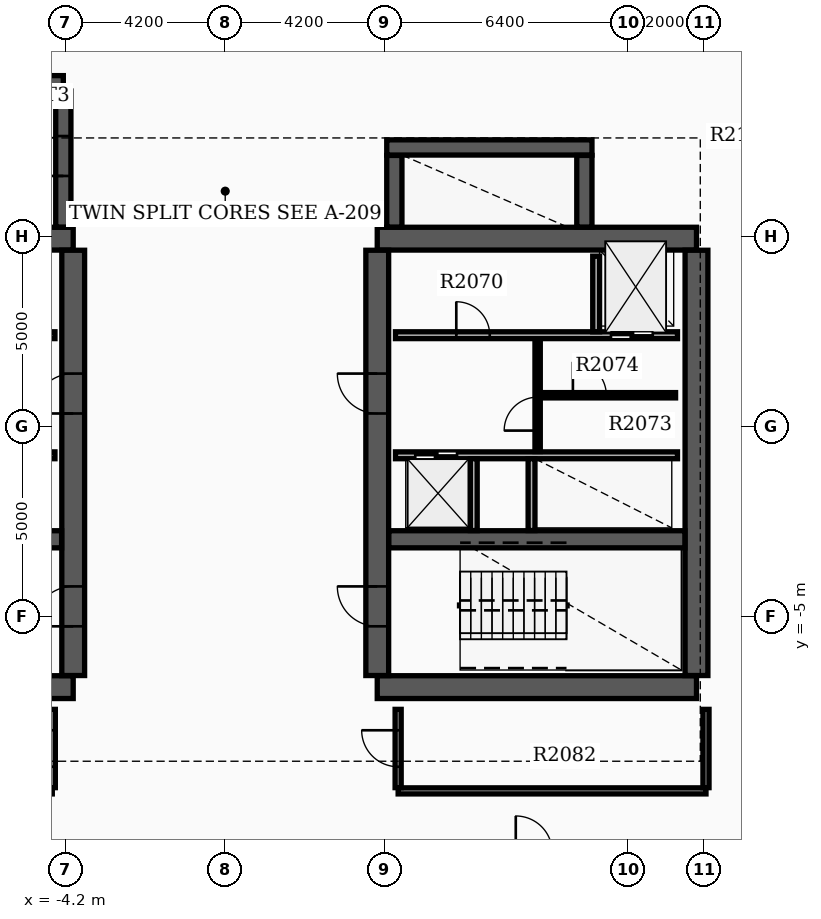
"""IFC4 building model, lengths in metres.
Left out: names, types, materials, properties, quantities, classifications, styles, units other than length and angle.
Written with IfcOpenShell. Run it as: python <this file> out.ifc"""

import sys

from ifc_helpers import new_model, si_unit, direction, frame, frame_2d, origin, place, context, subcontext, project, spatial, rectangle, extrude, element, fill, save


model = new_model("IFC4")
c1 = context("Model", 3, precision=1e-05, world=origin(), true_north=direction((0.0, 1.0)))
c2 = subcontext(c1, "Body", "Model", "MODEL_VIEW")
j1 = project(units=[si_unit("LENGTHUNIT", "METRE"), si_unit("PLANEANGLEUNIT", "RADIAN")], contexts=[c1])
p1 = place(None, origin())
s1 = spatial("IfcSite", under=j1, at=p1, CompositionType="ELEMENT")
p2 = place(p1, origin())
s2 = spatial("IfcBuilding", under=s1, at=p2, CompositionType="ELEMENT")
p3 = place(p2, frame((0.0, 0.0, 132.0)))
s3 = spatial("IfcBuildingStorey", under=s2, at=p3, CompositionType="ELEMENT", Elevation=132.0)
for number, where, z_axis, x_axis in (
    (1, (-12.4, -6.85, 0.0), (0.0, 0.0, 1.0), (1.0, 0.0, 0.0)),
    (2, (-12.4, 4.95, 0.0), (0.0, 0.0, 1.0), (1.0, 0.0, 0.0)),
):
    element("IfcWall", number, at=place(p3, frame(where, z_axis=z_axis, x_axis=x_axis)), inside=s3, PredefinedType="SHEAR", context=c2, shape_type="SweptSolid", body=[
        extrude(rectangle(XDim=8.4, YDim=0.6, at=frame_2d((4.2, 0.0))), origin(), (0.0, 0.0, 1.0), 3.7),
    ])
p4 = place(p3, frame((-4.0, -6.545, 0.0), z_axis=(0.0, 0.0, 1.0), x_axis=(0.0, 1.0, 0.0)))
e3 = element("IfcWall", 3, at=p4, inside=s3, PredefinedType="SHEAR", context=c2, shape_type="SweptSolid", body=[
    extrude(rectangle(XDim=11.19, YDim=0.6, at=frame_2d((5.595, 0.0))), origin(), (0.0, 0.0, 1.0), 3.7),
])
p5 = place(p4, frame((1.295, 0.0, 0.0)))
e4 = element("IfcOpeningElement", 4, at=p5, cuts=e3, PredefinedType="OPENING", context=c2, shape_type="SweptSolid", body=[
    extrude(rectangle(XDim=1.05, YDim=2.15, at=frame_2d((0.525, 1.075))), frame((0.0, 0.31, 0.0), z_axis=(0.0, -1.0, 0.0), x_axis=(1.0, 0.0, 0.0)), (0.0, 0.0, 1.0), 0.62),
])
p6 = place(p4, frame((6.895, 0.0, 0.0)))
e5 = element("IfcOpeningElement", 5, at=p6, cuts=e3, PredefinedType="OPENING", context=c2, shape_type="SweptSolid", body=[
    extrude(rectangle(XDim=1.05, YDim=2.15, at=frame_2d((0.525, 1.075))), frame((0.0, 0.31, 0.0), z_axis=(0.0, -1.0, 0.0), x_axis=(1.0, 0.0, 0.0)), (0.0, 0.0, 1.0), 0.62),
])
p7 = place(p3, frame((-12.095, -2.96, 0.0), z_axis=(0.0, 0.0, 1.0), x_axis=(1.0, 0.0, 0.0)))
e6 = element("IfcWall", 6, at=p7, inside=s3, PredefinedType="SHEAR", context=c2, shape_type="SweptSolid", body=[
    extrude(rectangle(XDim=7.79, YDim=0.45, at=frame_2d((3.895, 0.0))), origin(), (0.0, 0.0, 1.0), 3.7),
])
for number, where, z_axis, x_axis in (
    (7, (4.0, -6.85, 0.0), (0.0, 0.0, 1.0), (1.0, 0.0, 0.0)),
    (8, (4.0, 4.95, 0.0), (0.0, 0.0, 1.0), (1.0, 0.0, 0.0)),
):
    element("IfcWall", number, at=place(p3, frame(where, z_axis=z_axis, x_axis=x_axis)), inside=s3, PredefinedType="SHEAR", context=c2, shape_type="SweptSolid", body=[
        extrude(rectangle(XDim=8.4, YDim=0.6, at=frame_2d((4.2, 0.0))), origin(), (0.0, 0.0, 1.0), 3.7),
    ])
p8 = place(p3, frame((4.0, -6.545, 0.0), z_axis=(0.0, 0.0, 1.0), x_axis=(0.0, 1.0, 0.0)))
e9 = element("IfcWall", 9, at=p8, inside=s3, PredefinedType="SHEAR", context=c2, shape_type="SweptSolid", body=[
    extrude(rectangle(XDim=11.19, YDim=0.6, at=frame_2d((5.595, 0.0))), origin(), (0.0, 0.0, 1.0), 3.7),
])
p9 = place(p8, frame((1.295, 0.0, 0.0)))
e10 = element("IfcOpeningElement", 10, at=p9, cuts=e9, PredefinedType="OPENING", context=c2, shape_type="SweptSolid", body=[
    extrude(rectangle(XDim=1.05, YDim=2.15, at=frame_2d((0.525, 1.075))), frame((0.0, 0.31, 0.0), z_axis=(0.0, -1.0, 0.0), x_axis=(1.0, 0.0, 0.0)), (0.0, 0.0, 1.0), 0.62),
])
p10 = place(p8, frame((6.895, 0.0, 0.0)))
e11 = element("IfcOpeningElement", 11, at=p10, cuts=e9, PredefinedType="OPENING", context=c2, shape_type="SweptSolid", body=[
    extrude(rectangle(XDim=1.05, YDim=2.15, at=frame_2d((0.525, 1.075))), frame((0.0, 0.31, 0.0), z_axis=(0.0, -1.0, 0.0), x_axis=(1.0, 0.0, 0.0)), (0.0, 0.0, 1.0), 0.62),
])
p11 = place(p3, frame((12.4, -6.545, 0.0), z_axis=(0.0, 0.0, 1.0), x_axis=(0.0, 1.0, 0.0)))
e12 = element("IfcWall", 12, at=p11, inside=s3, PredefinedType="SHEAR", context=c2, shape_type="SweptSolid", body=[
    extrude(rectangle(XDim=11.19, YDim=0.6, at=frame_2d((5.595, 0.0))), origin(), (0.0, 0.0, 1.0), 3.7),
])
p12 = place(p3, frame((4.305, -2.96, 0.0), z_axis=(0.0, 0.0, 1.0), x_axis=(1.0, 0.0, 0.0)))
e13 = element("IfcWall", 13, at=p12, inside=s3, PredefinedType="SHEAR", context=c2, shape_type="SweptSolid", body=[
    extrude(rectangle(XDim=7.79, YDim=0.45, at=frame_2d((3.895, 0.0))), origin(), (0.0, 0.0, 1.0), 3.7),
])
p13 = place(p3, frame((-12.22, 9.04, 0.0), z_axis=(0.0, 0.0, 1.0), x_axis=(1.0, 0.0, 0.0)))
e14 = element("IfcWall", 14, at=p13, inside=s3, PredefinedType="SHEAR", context=c2, shape_type="SweptSolid", body=[
    extrude(rectangle(XDim=7.96, YDim=0.4, at=frame_2d((3.98, 0.0))), origin(), (0.0, 0.0, 1.0), 3.7),
])
p14 = place(p3, frame((-4.26, 5.255, 0.0), z_axis=(0.0, 0.0, 1.0), x_axis=(0.0, 1.0, 0.0)))
e15 = element("IfcWall", 15, at=p14, inside=s3, PredefinedType="SHEAR", context=c2, shape_type="SweptSolid", body=[
    extrude(rectangle(XDim=3.58, YDim=0.4, at=frame_2d((1.79, 0.0))), origin(), (0.0, 0.0, 1.0), 3.7),
])
p15 = place(p14, frame((1.345, 0.0, 0.0)))
e16 = element("IfcOpeningElement", 16, at=p15, cuts=e15, PredefinedType="OPENING", context=c2, shape_type="SweptSolid", body=[
    extrude(rectangle(XDim=1.05, YDim=2.15, at=frame_2d((0.525, 1.075))), frame((0.0, 0.21, 0.0), z_axis=(0.0, -1.0, 0.0), x_axis=(1.0, 0.0, 0.0)), (0.0, 0.0, 1.0), 0.42),
])
p16 = place(p3, frame((4.45, 5.255, 0.0), z_axis=(0.0, 0.0, 1.0), x_axis=(0.0, 1.0, 0.0)))
e17 = element("IfcWall", 17, at=p16, inside=s3, PredefinedType="SHEAR", context=c2, shape_type="SweptSolid", body=[
    extrude(rectangle(XDim=1.885, YDim=0.4, at=frame_2d((0.942, 0.0))), origin(), (0.0, 0.0, 1.0), 3.7),
])
p17 = place(p3, frame((4.25, 7.35, 0.0), z_axis=(0.0, 0.0, 1.0), x_axis=(1.0, 0.0, 0.0)))
e18 = element("IfcWall", 18, at=p17, inside=s3, PredefinedType="SHEAR", context=c2, shape_type="SweptSolid", body=[
    extrude(rectangle(XDim=5.4, YDim=0.4, at=frame_2d((2.7, 0.0))), origin(), (0.0, 0.0, 1.0), 3.7),
])
p18 = place(p3, frame((9.45, 5.255, 0.0), z_axis=(0.0, 0.0, 1.0), x_axis=(0.0, 1.0, 0.0)))
e19 = element("IfcWall", 19, at=p18, inside=s3, PredefinedType="SHEAR", context=c2, shape_type="SweptSolid", body=[
    extrude(rectangle(XDim=1.885, YDim=0.4, at=frame_2d((0.942, 0.0))), origin(), (0.0, 0.0, 1.0), 3.7),
])
p19 = place(p3, frame((-11.9, 2.41, 0.0), z_axis=(0.0, 0.0, 1.0), x_axis=(1.0, 0.0, 0.0)))
e20 = element("IfcWall", 20, at=p19, inside=s3, PredefinedType="SOLIDWALL", context=c2, shape_type="SweptSolid", body=[
    extrude(rectangle(XDim=7.42, YDim=0.18, at=frame_2d((3.71, 0.0))), origin(), (0.0, 0.0, 1.0), 2.96),
])
p20 = place(p19, frame((0.55, 0.0, 0.0)))
e21 = element("IfcOpeningElement", 21, at=p20, cuts=e20, PredefinedType="OPENING", context=c2, shape_type="SweptSolid", body=[
    extrude(rectangle(XDim=1.1, YDim=2.15, at=frame_2d((0.55, 1.075))), frame((0.0, 0.1, 0.0), z_axis=(0.0, -1.0, 0.0), x_axis=(1.0, 0.0, 0.0)), (0.0, 0.0, 1.0), 0.2),
])
p21 = place(p19, frame((4.9, 0.0, 0.0)))
e22 = element("IfcOpeningElement", 22, at=p21, cuts=e20, PredefinedType="OPENING", context=c2, shape_type="SweptSolid", body=[
    extrude(rectangle(XDim=0.88, YDim=2.1, at=frame_2d((0.44, 1.05))), frame((0.0, 0.1, 0.0), z_axis=(0.0, -1.0, 0.0), x_axis=(1.0, 0.0, 0.0)), (0.0, 0.0, 1.0), 0.2),
])
p22 = place(p3, frame((4.48, 2.41, 0.0), z_axis=(0.0, 0.0, 1.0), x_axis=(1.0, 0.0, 0.0)))
e23 = element("IfcWall", 23, at=p22, inside=s3, PredefinedType="SOLIDWALL", context=c2, shape_type="SweptSolid", body=[
    extrude(rectangle(XDim=7.42, YDim=0.18, at=frame_2d((3.71, 0.0))), origin(), (0.0, 0.0, 1.0), 2.96),
])
p23 = place(p22, frame((5.67, 0.0, 0.0)))
e24 = element("IfcOpeningElement", 24, at=p23, cuts=e23, PredefinedType="OPENING", context=c2, shape_type="SweptSolid", body=[
    extrude(rectangle(XDim=1.1, YDim=2.15, at=frame_2d((0.55, 1.075))), frame((0.0, 0.1, 0.0), z_axis=(0.0, -1.0, 0.0), x_axis=(1.0, 0.0, 0.0)), (0.0, 0.0, 1.0), 0.2),
])
p24 = place(p22, frame((1.6, 0.0, 0.0)))
e25 = element("IfcOpeningElement", 25, at=p24, cuts=e23, PredefinedType="OPENING", context=c2, shape_type="SweptSolid", body=[
    extrude(rectangle(XDim=0.88, YDim=2.1, at=frame_2d((0.44, 1.05))), frame((0.0, 0.1, 0.0), z_axis=(0.0, -1.0, 0.0), x_axis=(1.0, 0.0, 0.0)), (0.0, 0.0, 1.0), 0.2),
])
p25 = place(p3, frame((-11.9, -0.75, 0.0), z_axis=(0.0, 0.0, 1.0), x_axis=(1.0, 0.0, 0.0)))
e26 = element("IfcWall", 26, at=p25, inside=s3, PredefinedType="SOLIDWALL", context=c2, shape_type="SweptSolid", body=[
    extrude(rectangle(XDim=7.42, YDim=0.18, at=frame_2d((3.71, 0.0))), origin(), (0.0, 0.0, 1.0), 2.96),
])
p26 = place(p25, frame((0.45, 0.0, 0.0)))
e27 = element("IfcOpeningElement", 27, at=p26, cuts=e26, PredefinedType="OPENING", context=c2, shape_type="SweptSolid", body=[
    extrude(rectangle(XDim=1.1, YDim=2.15, at=frame_2d((0.55, 1.075))), frame((0.0, 0.1, 0.0), z_axis=(0.0, -1.0, 0.0), x_axis=(1.0, 0.0, 0.0)), (0.0, 0.0, 1.0), 0.2),
])
p27 = place(p25, frame((2.35, 0.0, 0.0)))
e28 = element("IfcOpeningElement", 28, at=p27, cuts=e26, PredefinedType="OPENING", context=c2, shape_type="SweptSolid", body=[
    extrude(rectangle(XDim=1.1, YDim=2.15, at=frame_2d((0.55, 1.075))), frame((0.0, 0.1, 0.0), z_axis=(0.0, -1.0, 0.0), x_axis=(1.0, 0.0, 0.0)), (0.0, 0.0, 1.0), 0.2),
])
p28 = place(p3, frame((4.48, -0.75, 0.0), z_axis=(0.0, 0.0, 1.0), x_axis=(1.0, 0.0, 0.0)))
e29 = element("IfcWall", 29, at=p28, inside=s3, PredefinedType="SOLIDWALL", context=c2, shape_type="SweptSolid", body=[
    extrude(rectangle(XDim=7.42, YDim=0.18, at=frame_2d((3.71, 0.0))), origin(), (0.0, 0.0, 1.0), 2.96),
])
p29 = place(p28, frame((0.52, 0.0, 0.0)))
e30 = element("IfcOpeningElement", 30, at=p29, cuts=e29, PredefinedType="OPENING", context=c2, shape_type="SweptSolid", body=[
    extrude(rectangle(XDim=1.1, YDim=2.15, at=frame_2d((0.55, 1.075))), frame((0.0, 0.1, 0.0), z_axis=(0.0, -1.0, 0.0), x_axis=(1.0, 0.0, 0.0)), (0.0, 0.0, 1.0), 0.2),
])
p30 = place(p3, frame((9.76, 2.5, 0.0), z_axis=(0.0, 0.0, 1.0), x_axis=(0.0, 1.0, 0.0)))
e31 = element("IfcWall", 31, at=p30, inside=s3, PredefinedType="SOLIDWALL", context=c2, shape_type="SweptSolid", body=[
    extrude(rectangle(XDim=1.99, YDim=0.18, at=frame_2d((0.995, 0.0))), origin(), (0.0, 0.0, 1.0), 2.96),
])
for number, where, z_axis, x_axis in (
    (32, (6.54, -2.73, 0.0), (0.0, 0.0, 1.0), (0.0, 1.0, 0.0)),
    (33, (8.06, -2.73, 0.0), (0.0, 0.0, 1.0), (0.0, 1.0, 0.0)),
):
    element("IfcWall", number, at=place(p3, frame(where, z_axis=z_axis, x_axis=x_axis)), inside=s3, PredefinedType="SOLIDWALL", context=c2, shape_type="SweptSolid", body=[
        extrude(rectangle(XDim=1.89, YDim=0.18, at=frame_2d((0.945, 0.0))), origin(), (0.0, 0.0, 1.0), 2.96),
    ])
p31 = place(p3, frame((8.22, -0.65, 0.0), z_axis=(0.0, 0.0, 1.0), x_axis=(0.0, 1.0, 0.0)))
e34 = element("IfcWall", 34, at=p31, inside=s3, PredefinedType="SOLIDWALL", context=c2, shape_type="SweptSolid", body=[
    extrude(rectangle(XDim=2.96, YDim=0.14, at=frame_2d((1.48, 0.0))), origin(), (0.0, 0.0, 1.0), 2.96),
])
p32 = place(p31, frame((0.55, 0.0, 0.0)))
e35 = element("IfcOpeningElement", 35, at=p32, cuts=e34, PredefinedType="OPENING", context=c2, shape_type="SweptSolid", body=[
    extrude(rectangle(XDim=0.88, YDim=2.1, at=frame_2d((0.44, 1.05))), frame((0.0, 0.08, 0.0), z_axis=(0.0, -1.0, 0.0), x_axis=(1.0, 0.0, 0.0)), (0.0, 0.0, 1.0), 0.16),
])
p33 = place(p3, frame((8.298, 0.83, 0.0), z_axis=(0.0, 0.0, 1.0), x_axis=(1.0, 0.0, 0.0)))
e36 = element("IfcWall", 36, at=p33, inside=s3, PredefinedType="PARTITIONING", context=c2, shape_type="SweptSolid", body=[
    extrude(rectangle(XDim=3.552, YDim=0.14, at=frame_2d((1.776, 0.0))), origin(), (0.0, 0.0, 1.0), 2.96),
])
p34 = place(p33, frame((0.85, 0.0, 0.0)))
e37 = element("IfcOpeningElement", 37, at=p34, cuts=e36, PredefinedType="OPENING", context=c2, shape_type="SweptSolid", body=[
    extrude(rectangle(XDim=0.88, YDim=2.1, at=frame_2d((0.44, 1.05))), frame((0.0, 0.08, 0.0), z_axis=(0.0, -1.0, 0.0), x_axis=(1.0, 0.0, 0.0)), (0.0, 0.0, 1.0), 0.16),
])
p35 = place(p3, frame((4.55, -9.58, 0.0), z_axis=(0.0, 0.0, 1.0), x_axis=(1.0, 0.0, 0.0)))
e38 = element("IfcWall", 38, at=p35, inside=s3, PredefinedType="PARTITIONING", context=c2, shape_type="SweptSolid", body=[
    extrude(rectangle(XDim=8.1, YDim=0.16, at=frame_2d((4.05, 0.0))), origin(), (0.0, 0.0, 1.0), 2.96),
])
p36 = place(p3, frame((4.55, -9.495, 0.0), z_axis=(0.0, 0.0, 1.0), x_axis=(0.0, 1.0, 0.0)))
e39 = element("IfcWall", 39, at=p36, inside=s3, PredefinedType="PARTITIONING", context=c2, shape_type="SweptSolid", body=[
    extrude(rectangle(XDim=2.06, YDim=0.16, at=frame_2d((1.03, 0.0))), origin(), (0.0, 0.0, 1.0), 2.96),
])
p37 = place(p36, frame((0.55, 0.0, 0.0)))
e40 = element("IfcOpeningElement", 40, at=p37, cuts=e39, PredefinedType="OPENING", context=c2, shape_type="SweptSolid", body=[
    extrude(rectangle(XDim=0.96, YDim=2.15, at=frame_2d((0.48, 1.075))), frame((0.0, 0.09, 0.0), z_axis=(0.0, -1.0, 0.0), x_axis=(1.0, 0.0, 0.0)), (0.0, 0.0, 1.0), 0.18),
])
p38 = place(p3, frame((12.65, -9.495, 0.0), z_axis=(0.0, 0.0, 1.0), x_axis=(0.0, 1.0, 0.0)))
e41 = element("IfcWall", 41, at=p38, inside=s3, PredefinedType="PARTITIONING", context=c2, shape_type="SweptSolid", body=[
    extrude(rectangle(XDim=2.06, YDim=0.16, at=frame_2d((1.03, 0.0))), origin(), (0.0, 0.0, 1.0), 2.96),
])
p39 = place(p3, frame((-4.55, -9.495, 0.0), z_axis=(0.0, 0.0, 1.0), x_axis=(0.0, 1.0, 0.0)))
e42 = element("IfcWall", 42, at=p39, inside=s3, PredefinedType="PARTITIONING", context=c2, shape_type="SweptSolid", body=[
    extrude(rectangle(XDim=2.06, YDim=0.16, at=frame_2d((1.03, 0.0))), origin(), (0.0, 0.0, 1.0), 2.96),
])
p40 = place(p39, frame((0.55, 0.0, 0.0)))
e43 = element("IfcOpeningElement", 43, at=p40, cuts=e42, PredefinedType="OPENING", context=c2, shape_type="SweptSolid", body=[
    extrude(rectangle(XDim=0.96, YDim=2.15, at=frame_2d((0.48, 1.075))), frame((0.0, 0.09, 0.0), z_axis=(0.0, -1.0, 0.0), x_axis=(1.0, 0.0, 0.0)), (0.0, 0.0, 1.0), 0.18),
])
p41 = place(p5, origin())
e44 = element("IfcDoor", 44, at=p41, inside=s3, OperationType="SINGLE_SWING_LEFT", PredefinedType="DOOR", context=c2, shape_type="SweptSolid", body=[
    extrude(rectangle(XDim=1.05, YDim=2.15, at=frame_2d((0.525, 1.075))), frame((0.0, 0.025, 0.0), z_axis=(0.0, -1.0, 0.0), x_axis=(1.0, 0.0, 0.0)), (0.0, 0.0, 1.0), 0.05),
])
fill(e4, e44)
p42 = place(p9, origin())
e45 = element("IfcDoor", 45, at=p42, inside=s3, OperationType="SINGLE_SWING_RIGHT", PredefinedType="DOOR", context=c2, shape_type="SweptSolid", body=[
    extrude(rectangle(XDim=1.05, YDim=2.15, at=frame_2d((0.525, 1.075))), frame((0.0, 0.025, 0.0), z_axis=(0.0, -1.0, 0.0), x_axis=(1.0, 0.0, 0.0)), (0.0, 0.0, 1.0), 0.05),
])
fill(e10, e45)
p43 = place(p6, origin())
e46 = element("IfcDoor", 46, at=p43, inside=s3, OperationType="SINGLE_SWING_LEFT", PredefinedType="DOOR", context=c2, shape_type="SweptSolid", body=[
    extrude(rectangle(XDim=1.05, YDim=2.15, at=frame_2d((0.525, 1.075))), frame((0.0, 0.025, 0.0), z_axis=(0.0, -1.0, 0.0), x_axis=(1.0, 0.0, 0.0)), (0.0, 0.0, 1.0), 0.05),
])
fill(e5, e46)
p44 = place(p10, origin())
e47 = element("IfcDoor", 47, at=p44, inside=s3, OperationType="SINGLE_SWING_RIGHT", PredefinedType="DOOR", context=c2, shape_type="SweptSolid", body=[
    extrude(rectangle(XDim=1.05, YDim=2.15, at=frame_2d((0.525, 1.075))), frame((0.0, 0.025, 0.0), z_axis=(0.0, -1.0, 0.0), x_axis=(1.0, 0.0, 0.0)), (0.0, 0.0, 1.0), 0.05),
])
fill(e11, e47)
p45 = place(p15, origin())
e48 = element("IfcDoor", 48, at=p45, inside=s3, OperationType="SINGLE_SWING_LEFT", PredefinedType="DOOR", context=c2, shape_type="SweptSolid", body=[
    extrude(rectangle(XDim=1.05, YDim=2.15, at=frame_2d((0.525, 1.075))), frame((0.0, 0.025, 0.0), z_axis=(0.0, -1.0, 0.0), x_axis=(1.0, 0.0, 0.0)), (0.0, 0.0, 1.0), 0.05),
])
fill(e16, e48)
p46 = place(p23, origin())
e49 = element("IfcDoor", 49, at=p46, inside=s3, OperationType="DOUBLE_DOOR_SLIDING", PredefinedType="DOOR", context=c2, shape_type="SweptSolid", body=[
    extrude(rectangle(XDim=1.1, YDim=2.15, at=frame_2d((0.55, 1.075))), frame((0.0, 0.025, 0.0), z_axis=(0.0, -1.0, 0.0), x_axis=(1.0, 0.0, 0.0)), (0.0, 0.0, 1.0), 0.05),
])
fill(e24, e49)
p47 = place(p29, origin())
e50 = element("IfcDoor", 50, at=p47, inside=s3, OperationType="DOUBLE_DOOR_SLIDING", PredefinedType="DOOR", context=c2, shape_type="SweptSolid", body=[
    extrude(rectangle(XDim=1.1, YDim=2.15, at=frame_2d((0.55, 1.075))), frame((0.0, 0.025, 0.0), z_axis=(0.0, -1.0, 0.0), x_axis=(1.0, 0.0, 0.0)), (0.0, 0.0, 1.0), 0.05),
])
fill(e30, e50)
p48 = place(p24, origin())
e51 = element("IfcDoor", 51, at=p48, inside=s3, OperationType="SINGLE_SWING_LEFT", PredefinedType="DOOR", context=c2, shape_type="SweptSolid", body=[
    extrude(rectangle(XDim=0.88, YDim=2.1, at=frame_2d((0.44, 1.05))), frame((0.0, 0.025, 0.0), z_axis=(0.0, -1.0, 0.0), x_axis=(1.0, 0.0, 0.0)), (0.0, 0.0, 1.0), 0.05),
])
fill(e25, e51)
p49 = place(p32, origin())
e52 = element("IfcDoor", 52, at=p49, inside=s3, OperationType="SINGLE_SWING_LEFT", PredefinedType="DOOR", context=c2, shape_type="SweptSolid", body=[
    extrude(rectangle(XDim=0.88, YDim=2.1, at=frame_2d((0.44, 1.05))), frame((0.0, 0.025, 0.0), z_axis=(0.0, -1.0, 0.0), x_axis=(1.0, 0.0, 0.0)), (0.0, 0.0, 1.0), 0.05),
])
fill(e35, e52)
p50 = place(p34, origin())
e53 = element("IfcDoor", 53, at=p50, inside=s3, OperationType="SINGLE_SWING_LEFT", PredefinedType="DOOR", context=c2, shape_type="SweptSolid", body=[
    extrude(rectangle(XDim=0.88, YDim=2.1, at=frame_2d((0.44, 1.05))), frame((0.0, 0.025, 0.0), z_axis=(0.0, -1.0, 0.0), x_axis=(1.0, 0.0, 0.0)), (0.0, 0.0, 1.0), 0.05),
])
fill(e37, e53)
p51 = place(p37, origin())
e54 = element("IfcDoor", 54, at=p51, inside=s3, OperationType="SINGLE_SWING_RIGHT", PredefinedType="DOOR", context=c2, shape_type="SweptSolid", body=[
    extrude(rectangle(XDim=0.96, YDim=2.15, at=frame_2d((0.48, 1.075))), frame((0.0, 0.025, 0.0), z_axis=(0.0, -1.0, 0.0), x_axis=(1.0, 0.0, 0.0)), (0.0, 0.0, 1.0), 0.05),
])
fill(e40, e54)
p52 = place(p40, origin())
e55 = element("IfcDoor", 55, at=p52, inside=s3, OperationType="SINGLE_SWING_LEFT", PredefinedType="DOOR", context=c2, shape_type="SweptSolid", body=[
    extrude(rectangle(XDim=0.96, YDim=2.15, at=frame_2d((0.48, 1.075))), frame((0.0, 0.025, 0.0), z_axis=(0.0, -1.0, 0.0), x_axis=(1.0, 0.0, 0.0)), (0.0, 0.0, 1.0), 0.05),
])
fill(e43, e55)
save(model, sys.argv[1])
